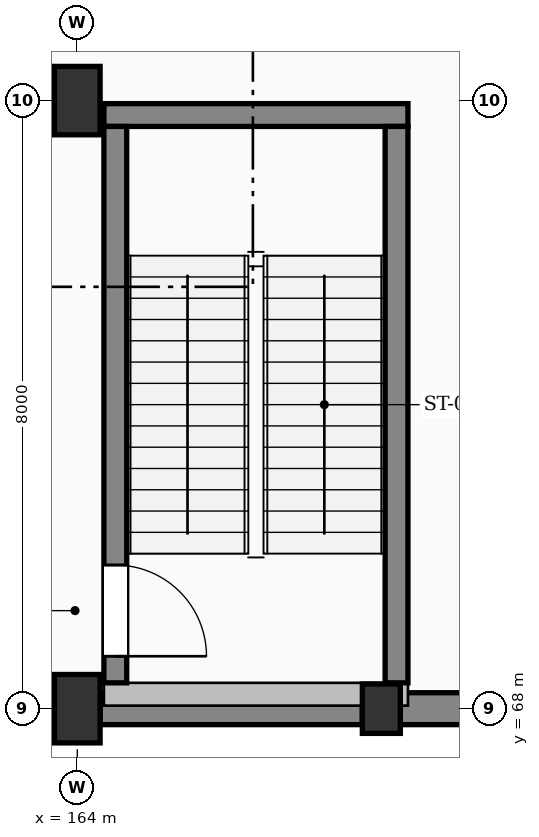
"""IFC4 building model, lengths in metres.
Left out: names, types, materials, properties, quantities, classifications, styles, units other than length and angle.
Written with IfcOpenShell. Run it as: python <this file> out.ifc"""

import sys

from ifc_helpers import new_model, si_unit, direction, frame, frame_2d, origin, origin_2d, place, context, subcontext, project, spatial, rectangle, extrude, element, fill, save


model = new_model("IFC4")
c1 = context("Model", 3, precision=1e-05, world=origin(), true_north=direction((0.0, 1.0)))
c2 = subcontext(c1, "Body", "Model", "MODEL_VIEW")
j1 = project(units=[si_unit("LENGTHUNIT", "METRE"), si_unit("PLANEANGLEUNIT", "RADIAN")], contexts=[c1])
p1 = place(None, origin())
s1 = spatial("IfcSite", under=j1, at=p1, CompositionType="ELEMENT")
p2 = place(p1, origin())
s2 = spatial("IfcBuilding", under=s1, at=p2, CompositionType="ELEMENT")
p3 = place(p2, frame((0.0, 0.0, -4.8)))
s3 = spatial("IfcBuildingStorey", under=s2, at=p3, CompositionType="ELEMENT", Elevation=-4.8)
for number, where, z_axis, x_axis in (
    (1, (164.0, 68.0, -0.38), (0.0, 0.0, 1.0), (1.0, 0.0, 0.0)),
    (2, (164.0, 76.0, -0.38), (0.0, 0.0, 1.0), (1.0, 0.0, 0.0)),
):
    element("IfcColumn", number, at=place(p3, frame(where, z_axis=z_axis, x_axis=x_axis)), inside=s3, PredefinedType="COLUMN", context=c2, shape_type="SweptSolid", body=[
        extrude(rectangle(XDim=0.6, YDim=0.9, at=origin_2d()), origin(), (0.0, 0.0, 1.0), 5.18),
    ])
p4 = place(p3, frame((168.0, 68.0, -0.38), z_axis=(0.0, 0.0, 1.0), x_axis=(1.0, 0.0, 0.0)))
e3 = element("IfcColumn", 3, at=p4, inside=s3, PredefinedType="PILASTER", context=c2, shape_type="SweptSolid", body=[
    extrude(rectangle(XDim=0.5, YDim=0.65, at=origin_2d()), origin(), (0.0, 0.0, 1.0), 5.18),
])
p5 = place(p3, frame((171.65, 68.0, 0.0), z_axis=(0.0, 0.0, 1.0), x_axis=(-1.0, 0.0, 0.0)))
e4 = element("IfcWall", 4, at=p5, inside=s3, PredefinedType="USERDEFINED", context=c2, shape_type="SweptSolid", body=[
    extrude(rectangle(XDim=3.4, YDim=0.42, at=frame_2d((1.7, 0.0))), origin(), (0.0, 0.0, 1.0), 3.85),
])
p6 = place(p3, frame((167.75, 68.0, 0.0), z_axis=(0.0, 0.0, 1.0), x_axis=(-1.0, 0.0, 0.0)))
e5 = element("IfcWall", 5, at=p6, inside=s3, PredefinedType="USERDEFINED", context=c2, shape_type="SweptSolid", body=[
    extrude(rectangle(XDim=3.45, YDim=0.42, at=frame_2d((1.725, 0.0))), origin(), (0.0, 0.0, 1.0), 3.85),
])
p7 = place(p3, frame((163.7, 68.0, 0.0), z_axis=(0.0, 0.0, 1.0), x_axis=(-1.0, 0.0, 0.0)))
e6 = element("IfcWall", 6, at=p7, inside=s3, PredefinedType="USERDEFINED", context=c2, shape_type="SweptSolid", body=[
    extrude(rectangle(XDim=3.5, YDim=0.42, at=frame_2d((1.75, 0.0))), origin(), (0.0, 0.0, 1.0), 3.85),
])
p8 = place(p3, frame((164.35, 68.19, 3.85), z_axis=(0.0, 0.0, 1.0), x_axis=(1.0, 0.0, 0.0)))
e7 = element("IfcWall", 7, at=p8, inside=s3, PredefinedType="SHEAR", context=c2, shape_type="SweptSolid", body=[
    extrude(rectangle(XDim=4.0, YDim=0.3, at=frame_2d((2.0, 0.0))), origin(), (0.0, 0.0, 1.0), 0.65),
])
p9 = place(p3, frame((168.35, 75.81, -0.38), z_axis=(0.0, 0.0, 1.0), x_axis=(-1.0, 0.0, 0.0)))
e8 = element("IfcWall", 8, at=p9, inside=s3, PredefinedType="SHEAR", context=c2, shape_type="SweptSolid", body=[
    extrude(rectangle(XDim=4.0, YDim=0.3, at=frame_2d((2.0, 0.0))), origin(), (0.0, 0.0, 1.0), 4.88),
])
p10 = place(p3, frame((164.5, 75.66, -0.38), z_axis=(0.0, 0.0, 1.0), x_axis=(0.0, -1.0, 0.0)))
e9 = element("IfcWall", 9, at=p10, inside=s3, PredefinedType="SHEAR", context=c2, shape_type="SweptSolid", body=[
    extrude(rectangle(XDim=7.32, YDim=0.3, at=frame_2d((3.66, 0.0))), origin(), (0.0, 0.0, 1.0), 4.88),
])
p11 = place(p10, frame((5.77, 0.0, 0.38)))
e10 = element("IfcOpeningElement", 10, at=p11, cuts=e9, PredefinedType="OPENING", context=c2, shape_type="SweptSolid", body=[
    extrude(rectangle(XDim=1.2, YDim=2.15, at=frame_2d((0.6, 1.075))), frame((0.0, 0.16, 0.0), z_axis=(0.0, -1.0, 0.0), x_axis=(1.0, 0.0, 0.0)), (0.0, 0.0, 1.0), 0.32),
])
p12 = place(p3, frame((168.2, 75.66, -0.38), z_axis=(0.0, 0.0, 1.0), x_axis=(0.0, -1.0, 0.0)))
e11 = element("IfcWall", 11, at=p12, inside=s3, PredefinedType="SHEAR", context=c2, shape_type="SweptSolid", body=[
    extrude(rectangle(XDim=7.32, YDim=0.3, at=frame_2d((3.66, 0.0))), origin(), (0.0, 0.0, 1.0), 4.88),
])
p13 = place(p11, origin())
e12 = element("IfcDoor", 12, at=p13, inside=s3, OperationType="SINGLE_SWING_RIGHT", PredefinedType="DOOR", context=c2, shape_type="SweptSolid", body=[
    extrude(rectangle(XDim=1.2, YDim=2.15, at=frame_2d((0.6, 1.075))), frame((0.0, 0.025, 0.0), z_axis=(0.0, -1.0, 0.0), x_axis=(1.0, 0.0, 0.0)), (0.0, 0.0, 1.0), 0.05),
])
fill(e10, e12)
save(model, sys.argv[1])
